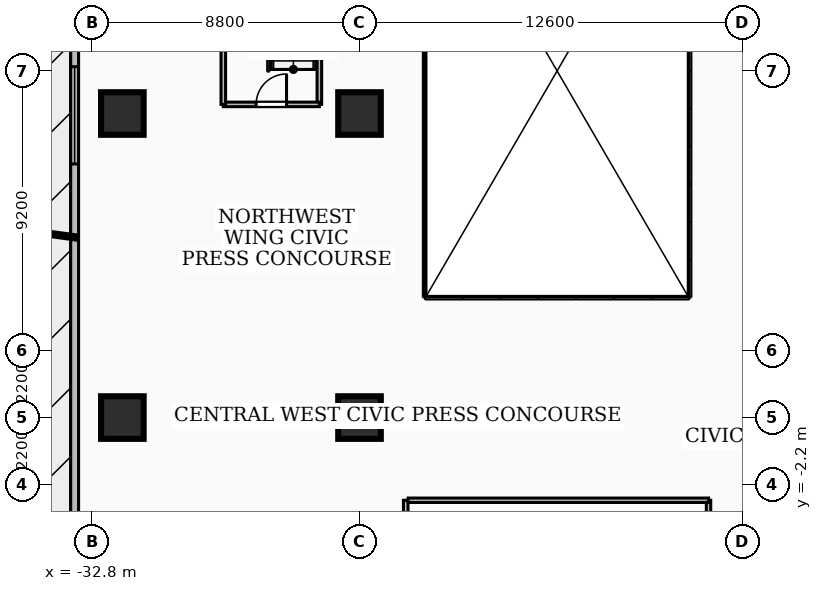
"""IFC4 building model, lengths in metres.
Left out: names, types, materials, properties, quantities, classifications, styles, units other than length and angle.
Written with IfcOpenShell. Run it as: python <this file> out.ifc"""

import sys

from ifc_helpers import new_model, si_unit, direction, frame, frame_2d, origin, origin_2d, place, context, subcontext, project, spatial, rectangle, extrude, element, fill, save


model = new_model("IFC4")
c1 = context("Model", 3, precision=1e-05, world=origin(), true_north=direction((0.0, 1.0)))
c2 = subcontext(c1, "Body", "Model", "MODEL_VIEW")
j1 = project(units=[si_unit("LENGTHUNIT", "METRE"), si_unit("PLANEANGLEUNIT", "RADIAN")], contexts=[c1])
p1 = place(None, origin())
s1 = spatial("IfcSite", under=j1, at=p1, CompositionType="ELEMENT")
p2 = place(p1, origin())
s2 = spatial("IfcBuilding", under=s1, at=p2, CompositionType="ELEMENT")
p3 = place(p2, frame((0.0, 0.0, 14.76)))
s3 = spatial("IfcBuildingStorey", under=s2, at=p3, CompositionType="ELEMENT", Elevation=14.76)
for number, where, z_axis, x_axis in (
    (1, (-31.8, 0.0, 0.0), (0.0, 0.0, 1.0), (1.0, 0.0, 0.0)),
    (2, (-31.8, 10.0, 0.0), (0.0, 0.0, 1.0), (1.0, 0.0, 0.0)),
    (3, (-24.0, 0.0, 0.0), (0.0, 0.0, 1.0), (1.0, 0.0, 0.0)),
    (4, (-24.0, 10.0, 0.0), (0.0, 0.0, 1.0), (1.0, 0.0, 0.0)),
):
    element("IfcColumn", number, at=place(p3, frame(where, z_axis=z_axis, x_axis=x_axis)), inside=s3, PredefinedType="COLUMN", context=c2, shape_type="SweptSolid", body=[
        extrude(rectangle(XDim=1.4, YDim=1.4, at=origin_2d()), origin(), (0.0, 0.0, 1.0), 4.68),
    ])
p4 = place(p3, frame((-33.37, -27.14, 0.0), z_axis=(0.0, 0.0, 1.0), x_axis=(0.0, 1.0, 0.0)))
e5 = element("IfcWall", 5, at=p4, inside=s3, PredefinedType="SOLIDWALL", context=c2, shape_type="SweptSolid", body=[
    extrude(rectangle(XDim=54.28, YDim=0.26, at=frame_2d((27.14, 0.0))), origin(), (0.0, 0.0, 1.0), 4.28),
])
p5 = place(p4, frame((21.59, 0.0, 0.0)))
e6 = element("IfcOpeningElement", 6, at=p5, cuts=e5, PredefinedType="OPENING", context=c2, shape_type="SweptSolid", body=[
    extrude(rectangle(XDim=1.1, YDim=2.1, at=frame_2d((0.55, 1.05))), frame((0.0, 0.14, 0.0), z_axis=(0.0, -1.0, 0.0), x_axis=(1.0, 0.0, 0.0)), (0.0, 0.0, 1.0), 0.28),
])
p6 = place(p4, frame((6.0, 0.0, 0.9)))
e7 = element("IfcOpeningElement", 7, at=p6, cuts=e5, PredefinedType="OPENING", context=c2, shape_type="SweptSolid", body=[
    extrude(rectangle(XDim=3.2, YDim=2.6, at=frame_2d((1.6, 1.3))), frame((0.0, 0.14, 0.0), z_axis=(0.0, -1.0, 0.0), x_axis=(1.0, 0.0, 0.0)), (0.0, 0.0, 1.0), 0.28),
])
p7 = place(p4, frame((15.6, 0.0, 0.9)))
e8 = element("IfcOpeningElement", 8, at=p7, cuts=e5, PredefinedType="OPENING", context=c2, shape_type="SweptSolid", body=[
    extrude(rectangle(XDim=3.2, YDim=2.6, at=frame_2d((1.6, 1.3))), frame((0.0, 0.14, 0.0), z_axis=(0.0, -1.0, 0.0), x_axis=(1.0, 0.0, 0.0)), (0.0, 0.0, 1.0), 0.28),
])
p8 = place(p4, frame((35.48, 0.0, 0.9)))
e9 = element("IfcOpeningElement", 9, at=p8, cuts=e5, PredefinedType="OPENING", context=c2, shape_type="SweptSolid", body=[
    extrude(rectangle(XDim=3.2, YDim=2.6, at=frame_2d((1.6, 1.3))), frame((0.0, 0.14, 0.0), z_axis=(0.0, -1.0, 0.0), x_axis=(1.0, 0.0, 0.0)), (0.0, 0.0, 1.0), 0.28),
])
p9 = place(p4, frame((45.08, 0.0, 0.9)))
e10 = element("IfcOpeningElement", 10, at=p9, cuts=e5, PredefinedType="OPENING", context=c2, shape_type="SweptSolid", body=[
    extrude(rectangle(XDim=3.2, YDim=2.6, at=frame_2d((1.6, 1.3))), frame((0.0, 0.14, 0.0), z_axis=(0.0, -1.0, 0.0), x_axis=(1.0, 0.0, 0.0)), (0.0, 0.0, 1.0), 0.28),
])
for number, where, z_axis, x_axis in (
    (11, (-28.48, 10.3, 0.0), (0.0, 0.0, 1.0), (0.0, 1.0, 0.0)),
    (12, (-25.32, 10.3, 0.0), (0.0, 0.0, 1.0), (0.0, 1.0, 0.0)),
):
    element("IfcWall", number, at=place(p3, frame(where, z_axis=z_axis, x_axis=x_axis)), inside=s3, PredefinedType="PARTITIONING", context=c2, shape_type="SweptSolid", body=[
        extrude(rectangle(XDim=9.8, YDim=0.15, at=frame_2d((4.9, 0.0))), origin(), (0.0, 0.0, 1.0), 4.28),
    ])
p10 = place(p3, frame((-28.48, 10.3, 0.0), z_axis=(0.0, 0.0, 1.0), x_axis=(1.0, 0.0, 0.0)))
e13 = element("IfcWall", 13, at=p10, inside=s3, PredefinedType="PARTITIONING", context=c2, shape_type="SweptSolid", body=[
    extrude(rectangle(XDim=3.16, YDim=0.15, at=frame_2d((1.58, 0.0))), origin(), (0.0, 0.0, 1.0), 3.29),
])
p11 = place(p10, frame((1.08, 0.0, 0.0)))
e14 = element("IfcOpeningElement", 14, at=p11, cuts=e13, PredefinedType="OPENING", context=c2, shape_type="SweptSolid", body=[
    extrude(rectangle(XDim=1.0, YDim=2.1, at=frame_2d((0.5, 1.05))), frame((0.0, 0.085, 0.0), z_axis=(0.0, -1.0, 0.0), x_axis=(1.0, 0.0, 0.0)), (0.0, 0.0, 1.0), 0.17),
])
p12 = place(p3, frame((-12.52, -2.72, 0.0), z_axis=(0.0, 0.0, 1.0), x_axis=(0.0, -1.0, 0.0)))
e15 = element("IfcWall", 15, at=p12, inside=s3, PredefinedType="PARTITIONING", context=c2, shape_type="SweptSolid", body=[
    extrude(rectangle(XDim=17.36, YDim=0.145, at=frame_2d((8.68, 0.0))), origin(), (0.0, 0.0, 1.0), 3.29),
])
p13 = place(p12, frame((8.26, 0.0, 0.0)))
e16 = element("IfcOpeningElement", 16, at=p13, cuts=e15, PredefinedType="OPENING", context=c2, shape_type="SweptSolid", body=[
    extrude(rectangle(XDim=1.0, YDim=2.1, at=frame_2d((0.5, 1.05))), frame((0.0, 0.083, 0.0), z_axis=(0.0, -1.0, 0.0), x_axis=(1.0, 0.0, 0.0)), (0.0, 0.0, 1.0), 0.165),
])
p14 = place(p3, frame((-22.4, -2.72, 0.0), z_axis=(0.0, 0.0, 1.0), x_axis=(1.0, 0.0, 0.0)))
e17 = element("IfcWall", 17, at=p14, inside=s3, PredefinedType="PARTITIONING", context=c2, shape_type="SweptSolid", body=[
    extrude(rectangle(XDim=9.88, YDim=0.145, at=frame_2d((4.94, 0.0))), origin(), (0.0, 0.0, 1.0), 4.28),
])
p15 = place(p3, frame((-22.48, -20.08, 0.0), z_axis=(0.0, 0.0, 1.0), x_axis=(0.0, 1.0, 0.0)))
e18 = element("IfcWall", 18, at=p15, inside=s3, PredefinedType="PARTITIONING", context=c2, shape_type="SweptSolid", body=[
    extrude(rectangle(XDim=17.36, YDim=0.15, at=frame_2d((8.68, 0.0))), origin(), (0.0, 0.0, 1.0), 3.29),
])
p16 = place(p8, origin())
e19 = element("IfcWindow", 19, at=p16, inside=s3, PartitioningType="SINGLE_PANEL", PredefinedType="WINDOW", context=c2, shape_type="SweptSolid", body=[
    extrude(rectangle(XDim=3.2, YDim=2.6, at=frame_2d((1.6, 1.3))), frame((0.0, 0.03, 0.0), z_axis=(0.0, -1.0, 0.0), x_axis=(1.0, 0.0, 0.0)), (0.0, 0.0, 1.0), 0.06),
])
fill(e9, e19)
p17 = place(p11, origin())
e20 = element("IfcDoor", 20, at=p17, inside=s3, OperationType="SINGLE_SWING_RIGHT", PredefinedType="DOOR", context=c2, shape_type="SweptSolid", body=[
    extrude(rectangle(XDim=1.0, YDim=2.1, at=frame_2d((0.5, 1.05))), frame((0.0, 0.025, 0.0), z_axis=(0.0, -1.0, 0.0), x_axis=(1.0, 0.0, 0.0)), (0.0, 0.0, 1.0), 0.05),
])
fill(e14, e20)
save(model, sys.argv[1])
